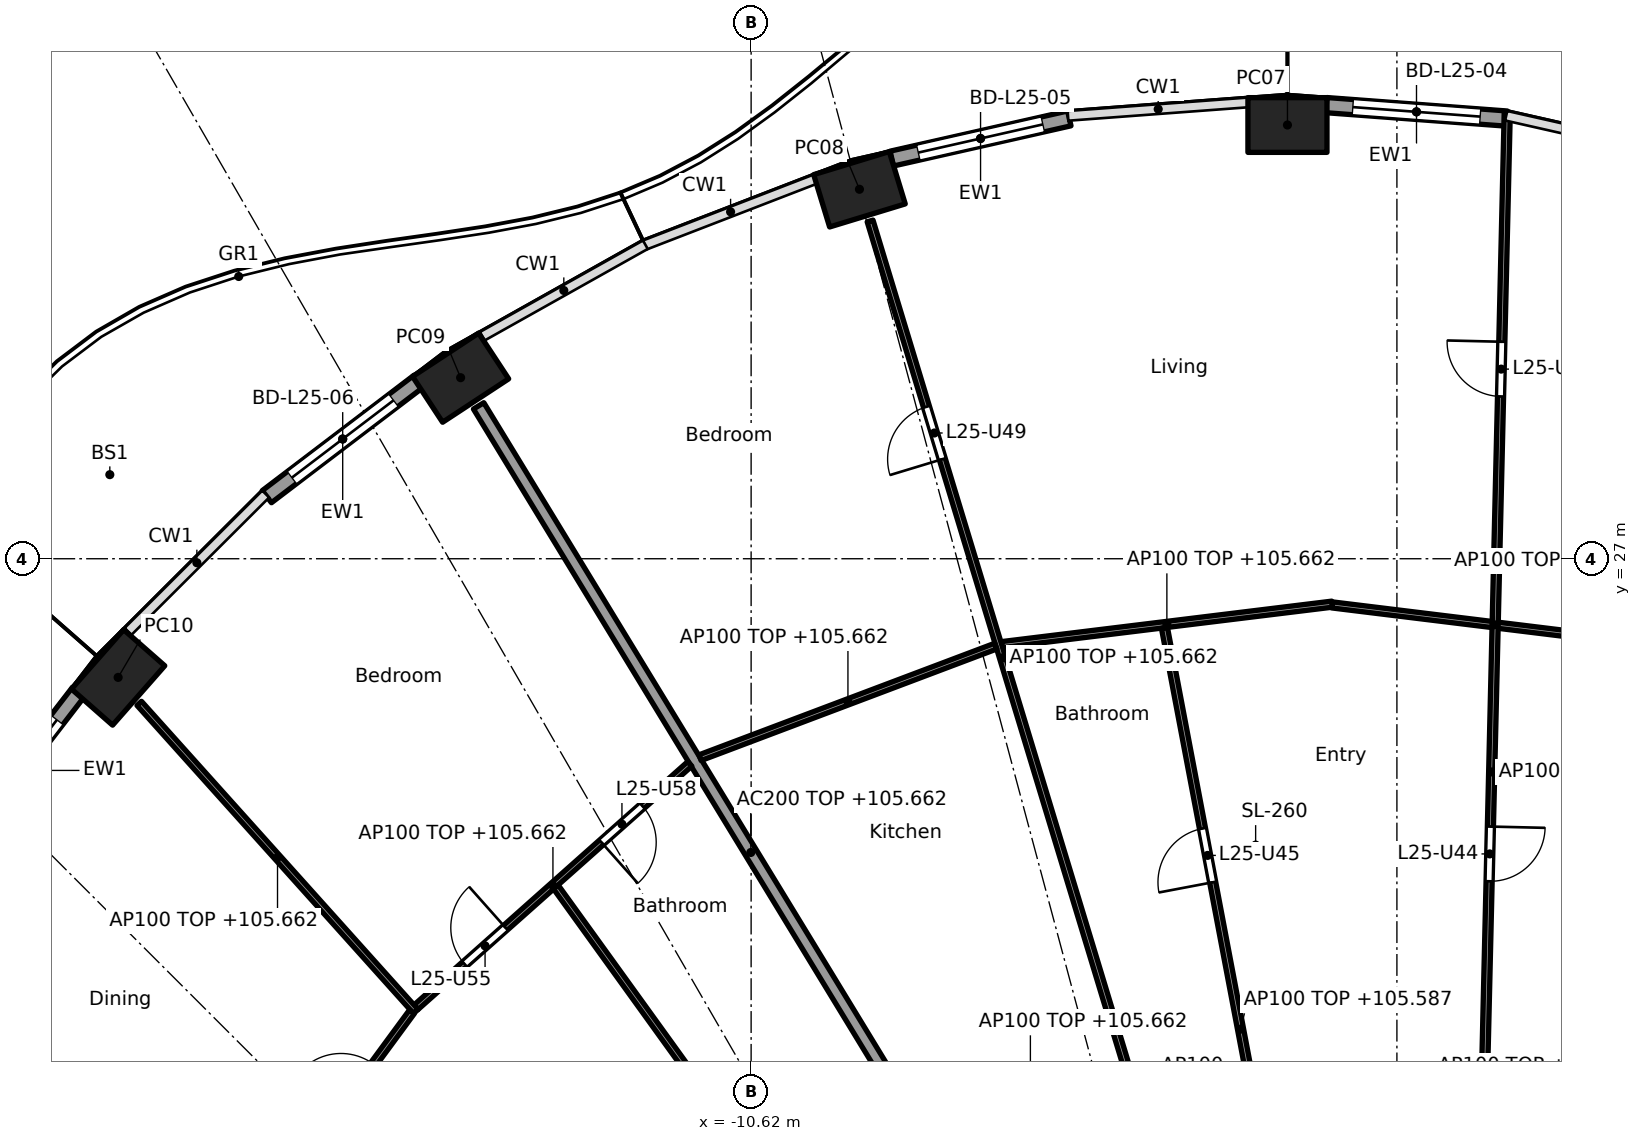
"""IFC4 building model, lengths in metres.
Left out: names, types, materials, properties, quantities, classifications, styles, units other than length and angle.
Written with IfcOpenShell. Run it as: python <this file> out.ifc"""

import sys

from ifc_helpers import new_model, si_unit, direction, frame, frame_2d, origin, origin_2d, place, context, subcontext, project, spatial, rectangle, hollow_rectangle, extrude, element, fill, save


model = new_model("IFC4")
c1 = context("Model", 3, precision=1e-05, world=origin(), true_north=direction((0.0, 1.0)))
c2 = subcontext(c1, "Body", "Model", "MODEL_VIEW")
j1 = project(units=[si_unit("LENGTHUNIT", "METRE"), si_unit("PLANEANGLEUNIT", "RADIAN")], contexts=[c1])
p1 = place(None, origin())
s1 = spatial("IfcSite", under=j1, at=p1, CompositionType="ELEMENT")
p2 = place(p1, origin())
s2 = spatial("IfcBuilding", under=s1, at=p2, CompositionType="ELEMENT")
p3 = place(p2, frame((0.0, 0.0, 102.9)))
s3 = spatial("IfcBuildingStorey", under=s2, at=p3, CompositionType="ELEMENT", Elevation=102.9)
for number, where, z_axis, x_axis in (
    (1, (-1.8, 34.133, 0.0), (0.0, 0.0, 1.0), (-1.0, 0.0, 0.0)),
    (2, (-8.839, 33.076, 0.0), (0.0, 0.0, 1.0), (-0.957, -0.292, 0.0)),
    (3, (-15.397, 29.978, 0.0), (0.0, 0.0, 1.0), (-0.836, -0.549, 0.0)),
    (4, (-21.03, 25.049, 0.0), (0.0, 0.0, 1.0), (-0.66, -0.751, 0.0)),
):
    element("IfcColumn", number, at=place(p3, frame(where, z_axis=z_axis, x_axis=x_axis)), inside=s3, PredefinedType="COLUMN", context=c2, shape_type="SweptSolid", body=[
        extrude(hollow_rectangle(XDim=1.3, YDim=0.9, WallThickness=0.045, at=origin_2d()), origin(), (0.0, 0.0, 1.0), 3.7),
    ])
p4 = place(p3, frame((-1.161, 34.46, 0.0), z_axis=(0.0, 0.0, 1.0), x_axis=(0.997232262224, -0.074349278273, 0.0)))
e5 = element("IfcWall", 5, at=p4, inside=s3, PredefinedType="SOLIDWALL", context=c2, shape_type="SweptSolid", body=[
    extrude(rectangle(XDim=2.975, YDim=0.25, at=frame_2d((1.488, 0.0))), origin(), (0.0, 0.0, 1.0), 3.44),
])
p5 = place(p4, frame((0.438, 0.0, 0.0)))
e6 = element("IfcOpeningElement", 6, at=p5, cuts=e5, PredefinedType="OPENING", context=c2, shape_type="SweptSolid", body=[
    extrude(rectangle(XDim=2.1, YDim=2.4, at=frame_2d((1.05, 1.2))), frame((0.0, 0.135, 0.0), z_axis=(0.0, -1.0, 0.0), x_axis=(1.0, 0.0, 0.0)), (0.0, 0.0, 1.0), 0.27),
])
p6 = place(p3, frame((-8.306, 33.58, 0.0), z_axis=(0.0, 0.0, 1.0), x_axis=(0.975317607872, 0.220806620767, 0.0)))
e7 = element("IfcWall", 7, at=p6, inside=s3, PredefinedType="SOLIDWALL", context=c2, shape_type="SweptSolid", body=[
    extrude(rectangle(XDim=2.993, YDim=0.25, at=frame_2d((1.497, 0.0))), origin(), (0.0, 0.0, 1.0), 3.44),
])
p7 = place(p6, frame((0.447, 0.0, 0.0)))
e8 = element("IfcOpeningElement", 8, at=p7, cuts=e7, PredefinedType="OPENING", context=c2, shape_type="SweptSolid", body=[
    extrude(rectangle(XDim=2.1, YDim=2.4, at=frame_2d((1.05, 1.2))), frame((0.0, 0.135, 0.0), z_axis=(0.0, -1.0, 0.0), x_axis=(1.0, 0.0, 0.0)), (0.0, 0.0, 1.0), 0.27),
])
p8 = place(p3, frame((-18.584, 28.021, 0.0), z_axis=(0.0, 0.0, 1.0), x_axis=(0.796037575978, 0.605247203736, 0.0)))
e9 = element("IfcWall", 9, at=p8, inside=s3, PredefinedType="SOLIDWALL", context=c2, shape_type="SweptSolid", body=[
    extrude(rectangle(XDim=3.134, YDim=0.25, at=frame_2d((1.567, 0.0))), origin(), (0.0, 0.0, 1.0), 3.44),
])
p9 = place(p8, frame((0.517, 0.0, 0.0)))
e10 = element("IfcOpeningElement", 10, at=p9, cuts=e9, PredefinedType="OPENING", context=c2, shape_type="SweptSolid", body=[
    extrude(rectangle(XDim=2.1, YDim=2.4, at=frame_2d((1.05, 1.2))), frame((0.0, 0.135, 0.0), z_axis=(0.0, -1.0, 0.0), x_axis=(1.0, 0.0, 0.0)), (0.0, 0.0, 1.0), 0.27),
])
p10 = place(p3, frame((-23.673, 22.227, 0.0), z_axis=(0.0, 0.0, 1.0), x_axis=(0.61041202934, 0.792084057684, 0.0)))
e11 = element("IfcWall", 11, at=p10, inside=s3, PredefinedType="SOLIDWALL", context=c2, shape_type="SweptSolid", body=[
    extrude(rectangle(XDim=3.263, YDim=0.25, at=frame_2d((1.631, 0.0))), origin(), (0.0, 0.0, 1.0), 3.44),
])
p11 = place(p10, frame((0.582, 0.0, 0.0)))
e12 = element("IfcOpeningElement", 12, at=p11, cuts=e11, PredefinedType="OPENING", context=c2, shape_type="SweptSolid", body=[
    extrude(rectangle(XDim=2.1, YDim=2.4, at=frame_2d((1.05, 1.2))), frame((0.0, 0.135, 0.0), z_axis=(0.0, -1.0, 0.0), x_axis=(1.0, 0.0, 0.0)), (0.0, 0.0, 1.0), 0.27),
])
p12 = place(p3, frame((-6.149, 14.825, 0.0), z_axis=(0.0, 0.0, 1.0), x_axis=(-0.520412862249, 0.853914780763, 0.0)))
e13 = element("IfcWall", 13, at=p12, inside=s3, PredefinedType="PARTITIONING", context=c2, shape_type="SweptSolid", body=[
    extrude(rectangle(XDim=17.202, YDim=0.2, at=frame_2d((8.601, 0.0))), origin(), (0.0, 0.0, 1.0), 2.762),
])
p13 = place(p3, frame((4.267, 25.587, 0.0), z_axis=(0.0, 0.0, 1.0), x_axis=(-0.992576206119, 0.121624319302, 0.0)))
e14 = element("IfcWall", 14, at=p13, inside=s3, PredefinedType="PARTITIONING", context=c2, shape_type="SweptSolid", body=[
    extrude(rectangle(XDim=5.374, YDim=0.1, at=frame_2d((2.687, 0.0))), origin(), (0.0, 0.0, 1.0), 2.762),
])
p14 = place(p3, frame((1.303, 12.665, 0.0), z_axis=(0.0, 0.0, 1.0), x_axis=(0.023564110689, 0.999722327793, 0.0)))
e15 = element("IfcWall", 15, at=p14, inside=s3, PredefinedType="PARTITIONING", context=c2, shape_type="SweptSolid", body=[
    extrude(rectangle(XDim=21.664, YDim=0.1, at=frame_2d((10.832, 0.0))), origin(), (0.0, 0.0, 1.0), 2.687),
])
p15 = place(p14, frame((2.407, 0.0, 0.0)))
e16 = element("IfcOpeningElement", 16, at=p15, cuts=e15, PredefinedType="OPENING", context=c2, shape_type="SweptSolid", body=[
    extrude(rectangle(XDim=0.9, YDim=2.1, at=frame_2d((0.45, 1.05))), frame((0.0, 0.06, 0.0), z_axis=(0.0, -1.0, 0.0), x_axis=(1.0, 0.0, 0.0)), (0.0, 0.0, 1.0), 0.12),
])
p16 = place(p14, frame((9.034, 0.0, 0.0)))
e17 = element("IfcOpeningElement", 17, at=p16, cuts=e15, PredefinedType="OPENING", context=c2, shape_type="SweptSolid", body=[
    extrude(rectangle(XDim=0.9, YDim=2.1, at=frame_2d((0.45, 1.05))), frame((0.0, 0.06, 0.0), z_axis=(0.0, -1.0, 0.0), x_axis=(1.0, 0.0, 0.0)), (0.0, 0.0, 1.0), 0.12),
])
p17 = place(p14, frame((17.009, 0.0, 0.0)))
e18 = element("IfcOpeningElement", 18, at=p17, cuts=e15, PredefinedType="OPENING", context=c2, shape_type="SweptSolid", body=[
    extrude(rectangle(XDim=0.9, YDim=2.1, at=frame_2d((0.45, 1.05))), frame((0.0, 0.06, 0.0), z_axis=(0.0, -1.0, 0.0), x_axis=(1.0, 0.0, 0.0)), (0.0, 0.0, 1.0), 0.12),
])
p18 = place(p3, frame((-1.066, 26.253, 0.0), z_axis=(0.0, 0.0, 1.0), x_axis=(-0.992574853421, -0.121635358166, 0.0)))
e19 = element("IfcWall", 19, at=p18, inside=s3, PredefinedType="PARTITIONING", context=c2, shape_type="SweptSolid", body=[
    extrude(rectangle(XDim=5.473, YDim=0.1, at=frame_2d((2.737, 0.0))), origin(), (0.0, 0.0, 1.0), 2.762),
])
p19 = place(p3, frame((-1.32, 12.663, 0.0), z_axis=(0.0, 0.0, 1.0), x_axis=(-0.186308855238, 0.982491226658, 0.0)))
e20 = element("IfcWall", 20, at=p19, inside=s3, PredefinedType="PARTITIONING", context=c2, shape_type="SweptSolid", body=[
    extrude(rectangle(XDim=13.437, YDim=0.1, at=frame_2d((6.719, 0.0))), origin(), (0.0, 0.0, 1.0), 2.687),
])
p20 = place(p19, frame((2.458, 0.0, 0.0)))
e21 = element("IfcOpeningElement", 21, at=p20, cuts=e20, PredefinedType="OPENING", context=c2, shape_type="SweptSolid", body=[
    extrude(rectangle(XDim=0.9, YDim=2.1, at=frame_2d((0.45, 1.05))), frame((0.0, 0.06, 0.0), z_axis=(0.0, -1.0, 0.0), x_axis=(1.0, 0.0, 0.0)), (0.0, 0.0, 1.0), 0.12),
])
p21 = place(p19, frame((9.177, 0.0, 0.0)))
e22 = element("IfcOpeningElement", 22, at=p21, cuts=e20, PredefinedType="OPENING", context=c2, shape_type="SweptSolid", body=[
    extrude(rectangle(XDim=0.9, YDim=2.1, at=frame_2d((0.45, 1.05))), frame((0.0, 0.06, 0.0), z_axis=(0.0, -1.0, 0.0), x_axis=(1.0, 0.0, 0.0)), (0.0, 0.0, 1.0), 0.12),
])
p22 = place(p3, frame((-4.306, 18.185, 0.0), z_axis=(0.0, 0.0, 1.0), x_axis=(-0.290183838394, 0.956970919064, 0.0)))
e23 = element("IfcWall", 23, at=p22, inside=s3, PredefinedType="PARTITIONING", context=c2, shape_type="SweptSolid", body=[
    extrude(rectangle(XDim=15.015, YDim=0.1, at=frame_2d((7.508, 0.0))), origin(), (0.0, 0.0, 1.0), 2.762),
])
p23 = place(p22, frame((10.922, 0.0, 0.0)))
e24 = element("IfcOpeningElement", 24, at=p23, cuts=e23, PredefinedType="OPENING", context=c2, shape_type="SweptSolid", body=[
    extrude(rectangle(XDim=0.9, YDim=2.1, at=frame_2d((0.45, 1.05))), frame((0.0, 0.06, 0.0), z_axis=(0.0, -1.0, 0.0), x_axis=(1.0, 0.0, 0.0)), (0.0, 0.0, 1.0), 0.12),
])
p24 = place(p3, frame((-6.596, 25.563, 0.0), z_axis=(0.0, 0.0, 1.0), x_axis=(-0.935624838262, -0.352995980185, 0.0)))
e25 = element("IfcWall", 25, at=p24, inside=s3, PredefinedType="PARTITIONING", context=c2, shape_type="SweptSolid", body=[
    extrude(rectangle(XDim=5.199, YDim=0.1, at=frame_2d((2.6, 0.0))), origin(), (0.0, 0.0, 1.0), 2.762),
])
p25 = place(p3, frame((-11.628, 23.626, 0.0), z_axis=(0.0, 0.0, 1.0), x_axis=(-0.747429444005, -0.664341197153, 0.0)))
e26 = element("IfcWall", 26, at=p25, inside=s3, PredefinedType="PARTITIONING", context=c2, shape_type="SweptSolid", body=[
    extrude(rectangle(XDim=6.024, YDim=0.1, at=frame_2d((3.012, 0.0))), origin(), (0.0, 0.0, 1.0), 2.762),
])
p26 = place(p25, frame((4.055, 0.0, 0.0)))
e27 = element("IfcOpeningElement", 27, at=p26, cuts=e26, PredefinedType="OPENING", context=c2, shape_type="SweptSolid", body=[
    extrude(rectangle(XDim=0.9, YDim=2.1, at=frame_2d((0.45, 1.05))), frame((0.0, 0.06, 0.0), z_axis=(0.0, -1.0, 0.0), x_axis=(1.0, 0.0, 0.0)), (0.0, 0.0, 1.0), 0.12),
])
p27 = place(p25, frame((1.043, 0.0, 0.0)))
e28 = element("IfcOpeningElement", 28, at=p27, cuts=e26, PredefinedType="OPENING", context=c2, shape_type="SweptSolid", body=[
    extrude(rectangle(XDim=0.9, YDim=2.1, at=frame_2d((0.45, 1.05))), frame((0.0, 0.06, 0.0), z_axis=(0.0, -1.0, 0.0), x_axis=(1.0, 0.0, 0.0)), (0.0, 0.0, 1.0), 0.12),
])
p28 = place(p3, frame((-6.49, 11.419, 0.0), z_axis=(0.0, 0.0, 1.0), x_axis=(-0.584832823883, 0.811153849839, 0.0)))
e29 = element("IfcWall", 29, at=p28, inside=s3, PredefinedType="PARTITIONING", context=c2, shape_type="SweptSolid", body=[
    extrude(rectangle(XDim=12.553, YDim=0.1, at=frame_2d((6.277, 0.0))), origin(), (0.0, 0.0, 1.0), 2.687),
])
p29 = place(p28, frame((4.166, 0.0, 0.0)))
e30 = element("IfcOpeningElement", 30, at=p29, cuts=e29, PredefinedType="OPENING", context=c2, shape_type="SweptSolid", body=[
    extrude(rectangle(XDim=0.9, YDim=2.1, at=frame_2d((0.45, 1.05))), frame((0.0, 0.06, 0.0), z_axis=(0.0, -1.0, 0.0), x_axis=(1.0, 0.0, 0.0)), (0.0, 0.0, 1.0), 0.12),
])
p30 = place(p3, frame((-16.134, 19.554, 0.0), z_axis=(0.0, 0.0, 1.0), x_axis=(-0.667985610263, 0.74417418961, 0.0)))
e31 = element("IfcWall", 31, at=p30, inside=s3, PredefinedType="PARTITIONING", context=c2, shape_type="SweptSolid", body=[
    extrude(rectangle(XDim=6.809, YDim=0.1, at=frame_2d((3.405, 0.0))), origin(), (0.0, 0.0, 1.0), 2.762),
])
p31 = place(p3, frame((-16.197, 19.551, 0.0), z_axis=(0.0, 0.0, 1.0), x_axis=(-0.592391983588, -0.80564988536, 0.0)))
e32 = element("IfcWall", 32, at=p31, inside=s3, PredefinedType="PARTITIONING", context=c2, shape_type="SweptSolid", body=[
    extrude(rectangle(XDim=6.08, YDim=0.1, at=frame_2d((3.04, 0.0))), origin(), (0.0, 0.0, 1.0), 2.762),
])
p32 = place(p31, frame((1.07, 0.0, 0.0)))
e33 = element("IfcOpeningElement", 33, at=p32, cuts=e32, PredefinedType="OPENING", context=c2, shape_type="SweptSolid", body=[
    extrude(rectangle(XDim=0.9, YDim=2.1, at=frame_2d((0.45, 1.05))), frame((0.0, 0.06, 0.0), z_axis=(0.0, -1.0, 0.0), x_axis=(1.0, 0.0, 0.0)), (0.0, 0.0, 1.0), 0.12),
])
p33 = place(p5, origin())
e34 = element("IfcDoor", 34, at=p33, inside=s3, OperationType="SLIDING_TO_LEFT", PredefinedType="DOOR", context=c2, shape_type="SweptSolid", body=[
    extrude(rectangle(XDim=2.1, YDim=2.4, at=frame_2d((1.05, 1.2))), frame((0.0, 0.025, 0.0), z_axis=(0.0, -1.0, 0.0), x_axis=(1.0, 0.0, 0.0)), (0.0, 0.0, 1.0), 0.05),
])
fill(e6, e34)
p34 = place(p7, origin())
e35 = element("IfcDoor", 35, at=p34, inside=s3, OperationType="SLIDING_TO_LEFT", PredefinedType="DOOR", context=c2, shape_type="SweptSolid", body=[
    extrude(rectangle(XDim=2.1, YDim=2.4, at=frame_2d((1.05, 1.2))), frame((0.0, 0.025, 0.0), z_axis=(0.0, -1.0, 0.0), x_axis=(1.0, 0.0, 0.0)), (0.0, 0.0, 1.0), 0.05),
])
fill(e8, e35)
p35 = place(p9, origin())
e36 = element("IfcDoor", 36, at=p35, inside=s3, OperationType="SLIDING_TO_LEFT", PredefinedType="DOOR", context=c2, shape_type="SweptSolid", body=[
    extrude(rectangle(XDim=2.1, YDim=2.4, at=frame_2d((1.05, 1.2))), frame((0.0, 0.025, 0.0), z_axis=(0.0, -1.0, 0.0), x_axis=(1.0, 0.0, 0.0)), (0.0, 0.0, 1.0), 0.05),
])
fill(e10, e36)
p36 = place(p11, origin())
e37 = element("IfcDoor", 37, at=p36, inside=s3, OperationType="SLIDING_TO_LEFT", PredefinedType="DOOR", context=c2, shape_type="SweptSolid", body=[
    extrude(rectangle(XDim=2.1, YDim=2.4, at=frame_2d((1.05, 1.2))), frame((0.0, 0.025, 0.0), z_axis=(0.0, -1.0, 0.0), x_axis=(1.0, 0.0, 0.0)), (0.0, 0.0, 1.0), 0.05),
])
fill(e12, e37)
p37 = place(p16, frame((0.9, 0.0, 0.0), x_axis=(-1.0, 0.0, 0.0)))
e38 = element("IfcDoor", 38, at=p37, inside=s3, OperationType="SINGLE_SWING_LEFT", PredefinedType="DOOR", context=c2, shape_type="SweptSolid", body=[
    extrude(rectangle(XDim=0.9, YDim=2.1, at=frame_2d((0.45, 1.05))), frame((0.0, 0.025, 0.0), z_axis=(0.0, -1.0, 0.0), x_axis=(1.0, 0.0, 0.0)), (0.0, 0.0, 1.0), 0.05),
])
fill(e17, e38)
p38 = place(p21, origin())
e39 = element("IfcDoor", 39, at=p38, inside=s3, OperationType="SINGLE_SWING_LEFT", PredefinedType="DOOR", context=c2, shape_type="SweptSolid", body=[
    extrude(rectangle(XDim=0.9, YDim=2.1, at=frame_2d((0.45, 1.05))), frame((0.0, 0.025, 0.0), z_axis=(0.0, -1.0, 0.0), x_axis=(1.0, 0.0, 0.0)), (0.0, 0.0, 1.0), 0.05),
])
fill(e22, e39)
p39 = place(p17, origin())
e40 = element("IfcDoor", 40, at=p39, inside=s3, OperationType="SINGLE_SWING_RIGHT", PredefinedType="DOOR", context=c2, shape_type="SweptSolid", body=[
    extrude(rectangle(XDim=0.9, YDim=2.1, at=frame_2d((0.45, 1.05))), frame((0.0, 0.025, 0.0), z_axis=(0.0, -1.0, 0.0), x_axis=(1.0, 0.0, 0.0)), (0.0, 0.0, 1.0), 0.05),
])
fill(e18, e40)
p40 = place(p23, origin())
e41 = element("IfcDoor", 41, at=p40, inside=s3, OperationType="SINGLE_SWING_LEFT", PredefinedType="DOOR", context=c2, shape_type="SweptSolid", body=[
    extrude(rectangle(XDim=0.9, YDim=2.1, at=frame_2d((0.45, 1.05))), frame((0.0, 0.025, 0.0), z_axis=(0.0, -1.0, 0.0), x_axis=(1.0, 0.0, 0.0)), (0.0, 0.0, 1.0), 0.05),
])
fill(e24, e41)
p41 = place(p26, frame((0.9, 0.0, 0.0), x_axis=(-1.0, 0.0, 0.0)))
e42 = element("IfcDoor", 42, at=p41, inside=s3, OperationType="SINGLE_SWING_RIGHT", PredefinedType="DOOR", context=c2, shape_type="SweptSolid", body=[
    extrude(rectangle(XDim=0.9, YDim=2.1, at=frame_2d((0.45, 1.05))), frame((0.0, 0.025, 0.0), z_axis=(0.0, -1.0, 0.0), x_axis=(1.0, 0.0, 0.0)), (0.0, 0.0, 1.0), 0.05),
])
fill(e27, e42)
p42 = place(p27, origin())
e43 = element("IfcDoor", 43, at=p42, inside=s3, OperationType="SINGLE_SWING_RIGHT", PredefinedType="DOOR", context=c2, shape_type="SweptSolid", body=[
    extrude(rectangle(XDim=0.9, YDim=2.1, at=frame_2d((0.45, 1.05))), frame((0.0, 0.025, 0.0), z_axis=(0.0, -1.0, 0.0), x_axis=(1.0, 0.0, 0.0)), (0.0, 0.0, 1.0), 0.05),
])
fill(e28, e43)
save(model, sys.argv[1])
